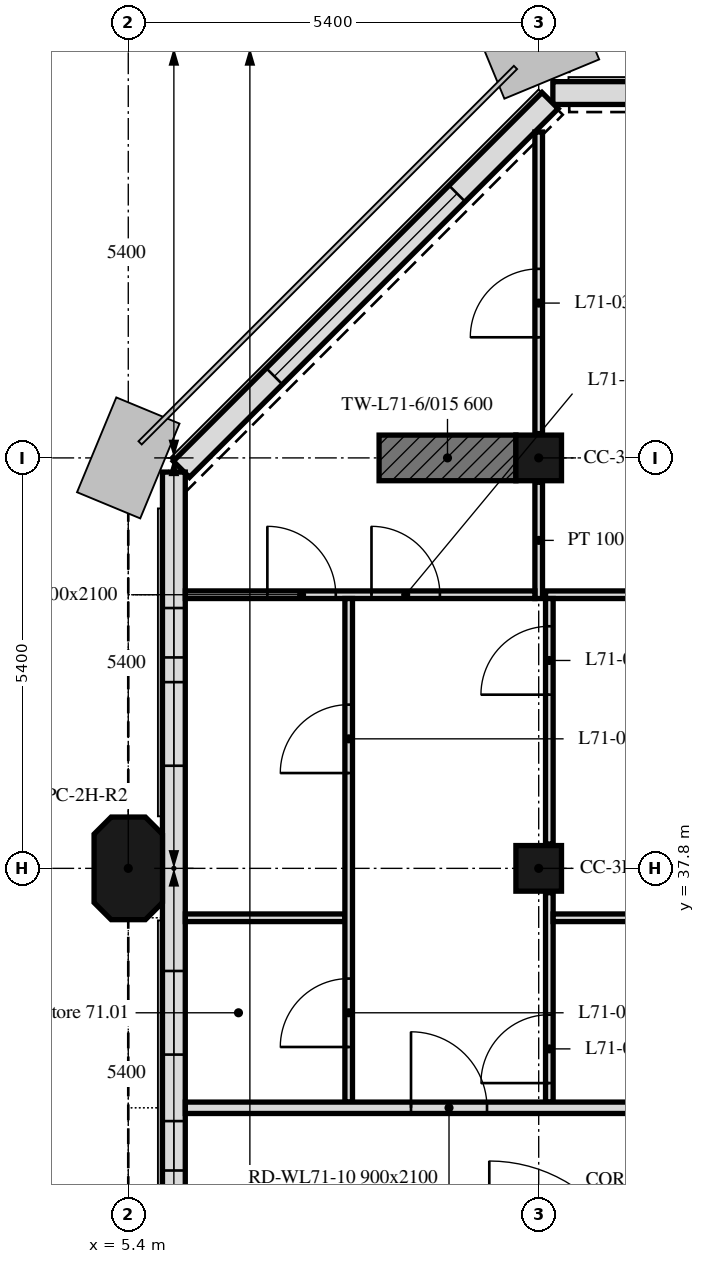
"""IFC4 building model, lengths in metres.
Left out: names, types, materials, properties, quantities, classifications, styles, units other than length and angle.
Written with IfcOpenShell. Run it as: python <this file> out.ifc"""

import sys

from ifc_helpers import new_model, si_unit, direction, frame, frame_2d, origin, origin_2d, place, context, subcontext, project, spatial, polyline, rectangle, outline, extrude, element, fill, save


model = new_model("IFC4")
c1 = context("Model", 3, precision=1e-05, world=origin(), true_north=direction((0.0, 1.0)))
c2 = subcontext(c1, "Body", "Model", "MODEL_VIEW")
j1 = project(units=[si_unit("LENGTHUNIT", "METRE"), si_unit("PLANEANGLEUNIT", "RADIAN")], contexts=[c1])
p1 = place(None, origin())
s1 = spatial("IfcSite", under=j1, at=p1, CompositionType="ELEMENT")
p2 = place(p1, origin())
s2 = spatial("IfcBuilding", under=s1, at=p2, CompositionType="ELEMENT")
p3 = place(p2, frame((0.0, 0.0, 288.4)))
s3 = spatial("IfcBuildingStorey", under=s2, at=p3, CompositionType="ELEMENT", Elevation=288.4)
p4 = place(p3, frame((5.4, 37.8, 0.0), z_axis=(0.0, 0.0, 1.0), x_axis=(0.0, 1.0, 0.0)))
e1 = element("IfcColumn", 1, at=p4, inside=s3, PredefinedType="COLUMN", context=c2, shape_type="SweptSolid", body=[
    extrude(outline(polyline([(-0.45, -0.45), (0.45, -0.45), (0.675, -0.225), (0.675, 0.225), (0.45, 0.45), (-0.45, 0.45), (-0.675, 0.225), (-0.675, -0.225), (-0.45, -0.45)])), origin(), (0.0, 0.0, 1.0), 3.0),
])
for number, where, z_axis, x_axis in (
    (2, (10.8, 37.8, 0.0), (0.0, 0.0, 1.0), (1.0, 0.0, 0.0)),
    (3, (10.8, 43.2, 0.0), (0.0, 0.0, 1.0), (1.0, 0.0, 0.0)),
):
    element("IfcColumn", number, at=place(p3, frame(where, z_axis=z_axis, x_axis=x_axis)), inside=s3, PredefinedType="COLUMN", context=c2, shape_type="SweptSolid", body=[
        extrude(rectangle(XDim=0.6, YDim=0.6, at=origin_2d()), origin(), (0.0, 0.0, 1.0), 3.0),
    ])
p5 = place(p3, frame((8.7, 43.2, 0.0), z_axis=(0.0, 0.0, 1.0), x_axis=(1.0, 0.0, 0.0)))
e4 = element("IfcWall", 4, at=p5, inside=s3, PredefinedType="SHEAR", context=c2, shape_type="SweptSolid", body=[
    extrude(rectangle(XDim=1.8, YDim=0.6, at=frame_2d((0.9, 0.0))), origin(), (0.0, 0.0, 1.0), 3.0),
])
p6 = place(p3, frame((43.014, 48.0, 0.0), z_axis=(0.0, 0.0, 1.0), x_axis=(-1.0, 0.0, 0.0)))
e5 = element("IfcWall", 5, at=p6, inside=s3, PredefinedType="SOLIDWALL", context=c2, shape_type="SweptSolid", body=[
    extrude(rectangle(XDim=32.027, YDim=0.3, at=frame_2d((16.014, 0.0))), origin(), (0.0, 0.0, 1.0), 3.0),
])
p7 = place(p6, frame((0.814, 0.0, 0.9)))
e6 = element("IfcOpeningElement", 6, at=p7, cuts=e5, PredefinedType="OPENING", context=c2, shape_type="SweptSolid", body=[
    extrude(rectangle(XDim=3.4, YDim=1.7, at=frame_2d((1.7, 0.85))), frame((0.0, 0.16, 0.0), z_axis=(0.0, -1.0, 0.0), x_axis=(1.0, 0.0, 0.0)), (0.0, 0.0, 1.0), 0.32),
])
p8 = place(p6, frame((7.664, 0.0, 0.9)))
e7 = element("IfcOpeningElement", 7, at=p8, cuts=e5, PredefinedType="OPENING", context=c2, shape_type="SweptSolid", body=[
    extrude(rectangle(XDim=0.5, YDim=1.7, at=frame_2d((0.25, 0.85))), frame((0.0, 0.16, 0.0), z_axis=(0.0, -1.0, 0.0), x_axis=(1.0, 0.0, 0.0)), (0.0, 0.0, 1.0), 0.32),
])
p9 = place(p6, frame((13.064, 0.0, 0.9)))
e8 = element("IfcOpeningElement", 8, at=p9, cuts=e5, PredefinedType="OPENING", context=c2, shape_type="SweptSolid", body=[
    extrude(rectangle(XDim=0.5, YDim=1.7, at=frame_2d((0.25, 0.85))), frame((0.0, 0.16, 0.0), z_axis=(0.0, -1.0, 0.0), x_axis=(1.0, 0.0, 0.0)), (0.0, 0.0, 1.0), 0.32),
])
p10 = place(p6, frame((18.464, 0.0, 0.9)))
e9 = element("IfcOpeningElement", 9, at=p10, cuts=e5, PredefinedType="OPENING", context=c2, shape_type="SweptSolid", body=[
    extrude(rectangle(XDim=0.5, YDim=1.7, at=frame_2d((0.25, 0.85))), frame((0.0, 0.16, 0.0), z_axis=(0.0, -1.0, 0.0), x_axis=(1.0, 0.0, 0.0)), (0.0, 0.0, 1.0), 0.32),
])
p11 = place(p6, frame((23.864, 0.0, 0.9)))
e10 = element("IfcOpeningElement", 10, at=p11, cuts=e5, PredefinedType="OPENING", context=c2, shape_type="SweptSolid", body=[
    extrude(rectangle(XDim=0.5, YDim=1.7, at=frame_2d((0.25, 0.85))), frame((0.0, 0.16, 0.0), z_axis=(0.0, -1.0, 0.0), x_axis=(1.0, 0.0, 0.0)), (0.0, 0.0, 1.0), 0.32),
])
p12 = place(p6, frame((28.164, 0.0, 0.9)))
e11 = element("IfcOpeningElement", 11, at=p12, cuts=e5, PredefinedType="OPENING", context=c2, shape_type="SweptSolid", body=[
    extrude(rectangle(XDim=1.1, YDim=1.7, at=frame_2d((0.55, 0.85))), frame((0.0, 0.16, 0.0), z_axis=(0.0, -1.0, 0.0), x_axis=(1.0, 0.0, 0.0)), (0.0, 0.0, 1.0), 0.32),
])
p13 = place(p3, frame((10.949, 47.901, 0.0), z_axis=(0.0, 0.0, 1.0), x_axis=(-0.707106781187, -0.707106781187, 0.0)))
e12 = element("IfcWall", 12, at=p13, inside=s3, PredefinedType="SOLIDWALL", context=c2, shape_type="SweptSolid", body=[
    extrude(rectangle(XDim=6.86, YDim=0.3, at=frame_2d((3.43, 0.0))), origin(), (0.0, 0.0, 1.0), 3.0),
])
p14 = place(p13, frame((1.73, 0.0, 0.9)))
e13 = element("IfcOpeningElement", 13, at=p14, cuts=e12, PredefinedType="OPENING", context=c2, shape_type="SweptSolid", body=[
    extrude(rectangle(XDim=3.4, YDim=1.7, at=frame_2d((1.7, 0.85))), frame((0.0, 0.16, 0.0), z_axis=(0.0, -1.0, 0.0), x_axis=(1.0, 0.0, 0.0)), (0.0, 0.0, 1.0), 0.32),
])
p15 = place(p3, frame((6.0, 43.014, 0.0), z_axis=(0.0, 0.0, 1.0), x_axis=(0.0, -1.0, 0.0)))
e14 = element("IfcWall", 14, at=p15, inside=s3, PredefinedType="SOLIDWALL", context=c2, shape_type="SweptSolid", body=[
    extrude(rectangle(XDim=10.614, YDim=0.3, at=frame_2d((5.307, 0.0))), origin(), (0.0, 0.0, 1.0), 3.0),
])
p16 = place(p15, frame((1.789, 0.0, 0.9)))
e15 = element("IfcOpeningElement", 15, at=p16, cuts=e14, PredefinedType="OPENING", context=c2, shape_type="SweptSolid", body=[
    extrude(rectangle(XDim=0.65, YDim=1.7, at=frame_2d((0.325, 0.85))), frame((0.0, 0.16, 0.0), z_axis=(0.0, -1.0, 0.0), x_axis=(1.0, 0.0, 0.0)), (0.0, 0.0, 1.0), 0.32),
])
p17 = place(p15, frame((2.764, 0.0, 0.9)))
e16 = element("IfcOpeningElement", 16, at=p17, cuts=e14, PredefinedType="OPENING", context=c2, shape_type="SweptSolid", body=[
    extrude(rectangle(XDim=1.1, YDim=1.7, at=frame_2d((0.55, 0.85))), frame((0.0, 0.16, 0.0), z_axis=(0.0, -1.0, 0.0), x_axis=(1.0, 0.0, 0.0)), (0.0, 0.0, 1.0), 0.32),
])
p18 = place(p15, frame((6.564, 0.0, 0.9)))
e17 = element("IfcOpeningElement", 17, at=p18, cuts=e14, PredefinedType="OPENING", context=c2, shape_type="SweptSolid", body=[
    extrude(rectangle(XDim=1.1, YDim=1.7, at=frame_2d((0.55, 0.85))), frame((0.0, 0.16, 0.0), z_axis=(0.0, -1.0, 0.0), x_axis=(1.0, 0.0, 0.0)), (0.0, 0.0, 1.0), 0.32),
])
p19 = place(p15, frame((8.539, 0.0, 0.9)))
e18 = element("IfcOpeningElement", 18, at=p19, cuts=e14, PredefinedType="OPENING", context=c2, shape_type="SweptSolid", body=[
    extrude(rectangle(XDim=0.65, YDim=1.7, at=frame_2d((0.325, 0.85))), frame((0.0, 0.16, 0.0), z_axis=(0.0, -1.0, 0.0), x_axis=(1.0, 0.0, 0.0)), (0.0, 0.0, 1.0), 0.32),
])
p20 = place(p3, frame((10.8, 41.35, 0.0), z_axis=(0.0, 0.0, 1.0), x_axis=(0.0, 1.0, 0.0)))
e19 = element("IfcWall", 19, at=p20, inside=s3, PredefinedType="PARTITIONING", context=c2, shape_type="SweptSolid", body=[
    extrude(rectangle(XDim=1.53, YDim=0.1, at=frame_2d((0.765, 0.0))), origin(), (0.0, 0.0, 1.0), 3.0),
])
p21 = place(p3, frame((10.8, 43.52, 0.0), z_axis=(0.0, 0.0, 1.0), x_axis=(0.0, 1.0, 0.0)))
e20 = element("IfcWall", 20, at=p21, inside=s3, PredefinedType="PARTITIONING", context=c2, shape_type="SweptSolid", body=[
    extrude(rectangle(XDim=3.968, YDim=0.1, at=frame_2d((1.984, 0.0))), origin(), (0.0, 0.0, 1.0), 3.0),
])
p22 = place(p21, frame((1.267, 0.0, 0.0)))
e21 = element("IfcOpeningElement", 21, at=p22, cuts=e20, PredefinedType="OPENING", context=c2, shape_type="SweptSolid", body=[
    extrude(rectangle(XDim=0.9, YDim=2.1, at=frame_2d((0.45, 1.05))), frame((0.0, 0.05, 0.0), z_axis=(0.0, -1.0, 0.0), x_axis=(1.0, 0.0, 0.0)), (0.0, 0.0, 1.0), 0.1),
])
p23 = place(p3, frame((6.151, 41.4, 0.0), z_axis=(0.0, 0.0, 1.0), x_axis=(1.0, 0.0, 0.0)))
e22 = element("IfcWall", 22, at=p23, inside=s3, PredefinedType="PARTITIONING", context=c2, shape_type="SweptSolid", body=[
    extrude(rectangle(XDim=4.599, YDim=0.1, at=frame_2d((2.3, 0.0))), origin(), (0.0, 0.0, 1.0), 3.0),
])
p24 = place(p23, frame((1.079, 0.0, 0.0)))
e23 = element("IfcOpeningElement", 23, at=p24, cuts=e22, PredefinedType="OPENING", context=c2, shape_type="SweptSolid", body=[
    extrude(rectangle(XDim=0.9, YDim=2.1, at=frame_2d((0.45, 1.05))), frame((0.0, 0.05, 0.0), z_axis=(0.0, -1.0, 0.0), x_axis=(1.0, 0.0, 0.0)), (0.0, 0.0, 1.0), 0.1),
])
p25 = place(p23, frame((2.449, 0.0, 0.0)))
e24 = element("IfcOpeningElement", 24, at=p25, cuts=e22, PredefinedType="OPENING", context=c2, shape_type="SweptSolid", body=[
    extrude(rectangle(XDim=0.9, YDim=2.1, at=frame_2d((0.45, 1.05))), frame((0.0, 0.05, 0.0), z_axis=(0.0, -1.0, 0.0), x_axis=(1.0, 0.0, 0.0)), (0.0, 0.0, 1.0), 0.1),
])
p26 = place(p3, frame((10.89, 41.4, 0.0), z_axis=(0.0, 0.0, 1.0), x_axis=(1.0, 0.0, 0.0)))
e25 = element("IfcWall", 25, at=p26, inside=s3, PredefinedType="PARTITIONING", context=c2, shape_type="SweptSolid", body=[
    extrude(rectangle(XDim=5.235, YDim=0.1, at=frame_2d((2.618, 0.0))), origin(), (0.0, 0.0, 1.0), 3.0),
])
p27 = place(p26, frame((3.15, 0.0, 0.0)))
e26 = element("IfcOpeningElement", 26, at=p27, cuts=e25, PredefinedType="OPENING", context=c2, shape_type="SweptSolid", body=[
    extrude(rectangle(XDim=0.9, YDim=2.1, at=frame_2d((0.45, 1.05))), frame((0.0, 0.05, 0.0), z_axis=(0.0, -1.0, 0.0), x_axis=(1.0, 0.0, 0.0)), (0.0, 0.0, 1.0), 0.1),
])
p28 = place(p3, frame((6.151, 37.15, 0.0), z_axis=(0.0, 0.0, 1.0), x_axis=(1.0, 0.0, 0.0)))
e27 = element("IfcWall", 27, at=p28, inside=s3, PredefinedType="PARTITIONING", context=c2, shape_type="SweptSolid", body=[
    extrude(rectangle(XDim=2.099, YDim=0.1, at=frame_2d((1.05, 0.0))), origin(), (0.0, 0.0, 1.0), 3.0),
])
p29 = place(p3, frame((8.3, 34.725, 0.0), z_axis=(0.0, 0.0, 1.0), x_axis=(0.0, 1.0, 0.0)))
e28 = element("IfcWall", 28, at=p29, inside=s3, PredefinedType="PARTITIONING", context=c2, shape_type="SweptSolid", body=[
    extrude(rectangle(XDim=6.625, YDim=0.1, at=frame_2d((3.312, 0.0))), origin(), (0.0, 0.0, 1.0), 3.0),
])
p30 = place(p29, frame((0.725, 0.0, 0.0)))
e29 = element("IfcOpeningElement", 29, at=p30, cuts=e28, PredefinedType="OPENING", context=c2, shape_type="SweptSolid", body=[
    extrude(rectangle(XDim=0.9, YDim=2.1, at=frame_2d((0.45, 1.05))), frame((0.0, 0.05, 0.0), z_axis=(0.0, -1.0, 0.0), x_axis=(1.0, 0.0, 0.0)), (0.0, 0.0, 1.0), 0.1),
])
p31 = place(p29, frame((4.329, 0.0, 0.0)))
e30 = element("IfcOpeningElement", 30, at=p31, cuts=e28, PredefinedType="OPENING", context=c2, shape_type="SweptSolid", body=[
    extrude(rectangle(XDim=0.9, YDim=2.1, at=frame_2d((0.45, 1.05))), frame((0.0, 0.05, 0.0), z_axis=(0.0, -1.0, 0.0), x_axis=(1.0, 0.0, 0.0)), (0.0, 0.0, 1.0), 0.1),
])
p32 = place(p3, frame((10.94, 34.725, 0.0), z_axis=(0.0, 0.0, 1.0), x_axis=(0.0, 1.0, 0.0)))
e31 = element("IfcWall", 31, at=p32, inside=s3, PredefinedType="PARTITIONING", context=c2, shape_type="SweptSolid", body=[
    extrude(rectangle(XDim=2.755, YDim=0.1, at=frame_2d((1.377, 0.0))), origin(), (0.0, 0.0, 1.0), 3.0),
])
p33 = place(p32, frame((0.25, 0.0, 0.0)))
e32 = element("IfcOpeningElement", 32, at=p33, cuts=e31, PredefinedType="OPENING", context=c2, shape_type="SweptSolid", body=[
    extrude(rectangle(XDim=0.9, YDim=2.1, at=frame_2d((0.45, 1.05))), frame((0.0, 0.05, 0.0), z_axis=(0.0, -1.0, 0.0), x_axis=(1.0, 0.0, 0.0)), (0.0, 0.0, 1.0), 0.1),
])
p34 = place(p3, frame((10.94, 38.12, 0.0), z_axis=(0.0, 0.0, 1.0), x_axis=(0.0, 1.0, 0.0)))
e33 = element("IfcWall", 33, at=p34, inside=s3, PredefinedType="PARTITIONING", context=c2, shape_type="SweptSolid", body=[
    extrude(rectangle(XDim=3.23, YDim=0.1, at=frame_2d((1.615, 0.0))), origin(), (0.0, 0.0, 1.0), 3.0),
])
p35 = place(p34, frame((1.965, 0.0, 0.0)))
e34 = element("IfcOpeningElement", 34, at=p35, cuts=e33, PredefinedType="OPENING", context=c2, shape_type="SweptSolid", body=[
    extrude(rectangle(XDim=0.9, YDim=2.1, at=frame_2d((0.45, 1.05))), frame((0.0, 0.05, 0.0), z_axis=(0.0, -1.0, 0.0), x_axis=(1.0, 0.0, 0.0)), (0.0, 0.0, 1.0), 0.1),
])
p36 = place(p3, frame((10.99, 37.15, 0.0), z_axis=(0.0, 0.0, 1.0), x_axis=(1.0, 0.0, 0.0)))
e35 = element("IfcWall", 35, at=p36, inside=s3, PredefinedType="PARTITIONING", context=c2, shape_type="SweptSolid", body=[
    extrude(rectangle(XDim=2.7, YDim=0.1, at=frame_2d((1.35, 0.0))), origin(), (0.0, 0.0, 1.0), 3.0),
])
p37 = place(p3, frame((6.151, 34.65, 0.0), z_axis=(0.0, 0.0, 1.0), x_axis=(1.0, 0.0, 0.0)))
e36 = element("IfcWall", 36, at=p37, inside=s3, PredefinedType="PARTITIONING", context=c2, shape_type="SweptSolid", body=[
    extrude(rectangle(XDim=41.698, YDim=0.15, at=frame_2d((20.849, 0.0))), origin(), (0.0, 0.0, 1.0), 2.4),
])
p38 = place(p37, frame((2.969, 0.0, 0.0)))
e37 = element("IfcOpeningElement", 37, at=p38, cuts=e36, PredefinedType="OPENING", context=c2, shape_type="SweptSolid", body=[
    extrude(rectangle(XDim=1.0, YDim=2.1, at=frame_2d((0.5, 1.05))), frame((0.0, 0.075, 0.0), z_axis=(0.0, -1.0, 0.0), x_axis=(1.0, 0.0, 0.0)), (0.0, 0.0, 1.0), 0.15),
])
p39 = place(p37, frame((12.944, 0.0, 0.0)))
e38 = element("IfcOpeningElement", 38, at=p39, cuts=e36, PredefinedType="OPENING", context=c2, shape_type="SweptSolid", body=[
    extrude(rectangle(XDim=1.0, YDim=2.1, at=frame_2d((0.5, 1.05))), frame((0.0, 0.075, 0.0), z_axis=(0.0, -1.0, 0.0), x_axis=(1.0, 0.0, 0.0)), (0.0, 0.0, 1.0), 0.15),
])
p40 = place(p37, frame((24.444, 0.0, 0.0)))
e39 = element("IfcOpeningElement", 39, at=p40, cuts=e36, PredefinedType="OPENING", context=c2, shape_type="SweptSolid", body=[
    extrude(rectangle(XDim=1.0, YDim=2.1, at=frame_2d((0.5, 1.05))), frame((0.0, 0.075, 0.0), z_axis=(0.0, -1.0, 0.0), x_axis=(1.0, 0.0, 0.0)), (0.0, 0.0, 1.0), 0.15),
])
p41 = place(p37, frame((34.964, 0.0, 0.0)))
e40 = element("IfcOpeningElement", 40, at=p41, cuts=e36, PredefinedType="OPENING", context=c2, shape_type="SweptSolid", body=[
    extrude(rectangle(XDim=1.0, YDim=2.1, at=frame_2d((0.5, 1.05))), frame((0.0, 0.075, 0.0), z_axis=(0.0, -1.0, 0.0), x_axis=(1.0, 0.0, 0.0)), (0.0, 0.0, 1.0), 0.15),
])
p42 = place(p14, origin())
e41 = element("IfcWindow", 41, at=p42, inside=s3, PartitioningType="SINGLE_PANEL", PredefinedType="WINDOW", context=c2, shape_type="SweptSolid", body=[
    extrude(rectangle(XDim=3.4, YDim=1.7, at=frame_2d((1.7, 0.85))), frame((0.0, 0.03, 0.0), z_axis=(0.0, -1.0, 0.0), x_axis=(1.0, 0.0, 0.0)), (0.0, 0.0, 1.0), 0.06),
])
fill(e13, e41)
p43 = place(p16, origin())
e42 = element("IfcWindow", 42, at=p43, inside=s3, PartitioningType="SINGLE_PANEL", PredefinedType="WINDOW", context=c2, shape_type="SweptSolid", body=[
    extrude(rectangle(XDim=0.65, YDim=1.7, at=frame_2d((0.325, 0.85))), frame((0.0, 0.03, 0.0), z_axis=(0.0, -1.0, 0.0), x_axis=(1.0, 0.0, 0.0)), (0.0, 0.0, 1.0), 0.06),
])
fill(e15, e42)
p44 = place(p17, origin())
e43 = element("IfcWindow", 43, at=p44, inside=s3, PartitioningType="SINGLE_PANEL", PredefinedType="WINDOW", context=c2, shape_type="SweptSolid", body=[
    extrude(rectangle(XDim=1.1, YDim=1.7, at=frame_2d((0.55, 0.85))), frame((0.0, 0.03, 0.0), z_axis=(0.0, -1.0, 0.0), x_axis=(1.0, 0.0, 0.0)), (0.0, 0.0, 1.0), 0.06),
])
fill(e16, e43)
p45 = place(p18, origin())
e44 = element("IfcWindow", 44, at=p45, inside=s3, PartitioningType="SINGLE_PANEL", PredefinedType="WINDOW", context=c2, shape_type="SweptSolid", body=[
    extrude(rectangle(XDim=1.1, YDim=1.7, at=frame_2d((0.55, 0.85))), frame((0.0, 0.03, 0.0), z_axis=(0.0, -1.0, 0.0), x_axis=(1.0, 0.0, 0.0)), (0.0, 0.0, 1.0), 0.06),
])
fill(e17, e44)
p46 = place(p19, origin())
e45 = element("IfcWindow", 45, at=p46, inside=s3, PartitioningType="SINGLE_PANEL", PredefinedType="WINDOW", context=c2, shape_type="SweptSolid", body=[
    extrude(rectangle(XDim=0.65, YDim=1.7, at=frame_2d((0.325, 0.85))), frame((0.0, 0.03, 0.0), z_axis=(0.0, -1.0, 0.0), x_axis=(1.0, 0.0, 0.0)), (0.0, 0.0, 1.0), 0.06),
])
fill(e18, e45)
p47 = place(p30, origin())
e46 = element("IfcDoor", 46, at=p47, inside=s3, OperationType="SINGLE_SWING_LEFT", PredefinedType="DOOR", context=c2, shape_type="SweptSolid", body=[
    extrude(rectangle(XDim=0.9, YDim=2.1, at=frame_2d((0.45, 1.05))), frame((0.0, 0.025, 0.0), z_axis=(0.0, -1.0, 0.0), x_axis=(1.0, 0.0, 0.0)), (0.0, 0.0, 1.0), 0.05),
])
fill(e29, e46)
p48 = place(p35, origin())
e47 = element("IfcDoor", 47, at=p48, inside=s3, OperationType="SINGLE_SWING_RIGHT", PredefinedType="DOOR", context=c2, shape_type="SweptSolid", body=[
    extrude(rectangle(XDim=0.9, YDim=2.1, at=frame_2d((0.45, 1.05))), frame((0.0, 0.025, 0.0), z_axis=(0.0, -1.0, 0.0), x_axis=(1.0, 0.0, 0.0)), (0.0, 0.0, 1.0), 0.05),
])
fill(e34, e47)
p49 = place(p33, origin())
e48 = element("IfcDoor", 48, at=p49, inside=s3, OperationType="SINGLE_SWING_RIGHT", PredefinedType="DOOR", context=c2, shape_type="SweptSolid", body=[
    extrude(rectangle(XDim=0.9, YDim=2.1, at=frame_2d((0.45, 1.05))), frame((0.0, 0.025, 0.0), z_axis=(0.0, -1.0, 0.0), x_axis=(1.0, 0.0, 0.0)), (0.0, 0.0, 1.0), 0.05),
])
fill(e32, e48)
p50 = place(p22, origin())
e49 = element("IfcDoor", 49, at=p50, inside=s3, OperationType="SINGLE_SWING_RIGHT", PredefinedType="DOOR", context=c2, shape_type="SweptSolid", body=[
    extrude(rectangle(XDim=0.9, YDim=2.1, at=frame_2d((0.45, 1.05))), frame((0.0, 0.025, 0.0), z_axis=(0.0, -1.0, 0.0), x_axis=(1.0, 0.0, 0.0)), (0.0, 0.0, 1.0), 0.05),
])
fill(e21, e49)
p51 = place(p24, origin())
e50 = element("IfcDoor", 50, at=p51, inside=s3, OperationType="SINGLE_SWING_RIGHT", PredefinedType="DOOR", context=c2, shape_type="SweptSolid", body=[
    extrude(rectangle(XDim=0.9, YDim=2.1, at=frame_2d((0.45, 1.05))), frame((0.0, 0.025, 0.0), z_axis=(0.0, -1.0, 0.0), x_axis=(1.0, 0.0, 0.0)), (0.0, 0.0, 1.0), 0.05),
])
fill(e23, e50)
p52 = place(p31, origin())
e51 = element("IfcDoor", 51, at=p52, inside=s3, OperationType="SINGLE_SWING_RIGHT", PredefinedType="DOOR", context=c2, shape_type="SweptSolid", body=[
    extrude(rectangle(XDim=0.9, YDim=2.1, at=frame_2d((0.45, 1.05))), frame((0.0, 0.025, 0.0), z_axis=(0.0, -1.0, 0.0), x_axis=(1.0, 0.0, 0.0)), (0.0, 0.0, 1.0), 0.05),
])
fill(e30, e51)
p53 = place(p25, origin())
e52 = element("IfcDoor", 52, at=p53, inside=s3, OperationType="SINGLE_SWING_LEFT", PredefinedType="DOOR", context=c2, shape_type="SweptSolid", body=[
    extrude(rectangle(XDim=0.9, YDim=2.1, at=frame_2d((0.45, 1.05))), frame((0.0, 0.025, 0.0), z_axis=(0.0, -1.0, 0.0), x_axis=(1.0, 0.0, 0.0)), (0.0, 0.0, 1.0), 0.05),
])
fill(e24, e52)
p54 = place(p38, origin())
e53 = element("IfcDoor", 53, at=p54, inside=s3, OperationType="SINGLE_SWING_RIGHT", PredefinedType="DOOR", context=c2, shape_type="SweptSolid", body=[
    extrude(rectangle(XDim=1.0, YDim=2.1, at=frame_2d((0.5, 1.05))), frame((0.0, 0.025, 0.0), z_axis=(0.0, -1.0, 0.0), x_axis=(1.0, 0.0, 0.0)), (0.0, 0.0, 1.0), 0.05),
])
fill(e37, e53)
save(model, sys.argv[1])
